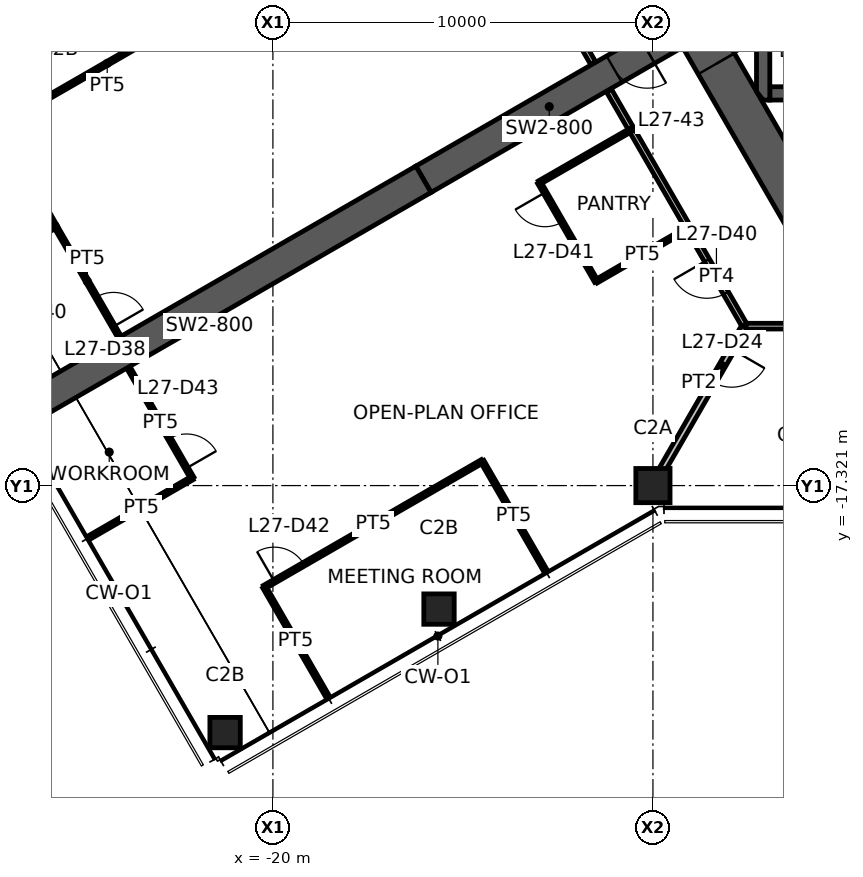
"""IFC4 building model, lengths in metres.
Left out: names, types, materials, properties, quantities, classifications, styles, units other than length and angle.
Written with IfcOpenShell. Run it as: python <this file> out.ifc"""

import sys

from ifc_helpers import new_model, si_unit, direction, frame, frame_2d, origin, origin_2d, place, context, subcontext, project, spatial, polyline, rectangle, hollow_rectangle, outline, extrude, element, fill, save


model = new_model("IFC4")
c1 = context("Model", 3, precision=1e-05, world=origin(), true_north=direction((0.0, 1.0)))
c2 = subcontext(c1, "Body", "Model", "MODEL_VIEW")
j1 = project(units=[si_unit("LENGTHUNIT", "METRE"), si_unit("PLANEANGLEUNIT", "RADIAN")], contexts=[c1])
p1 = place(None, origin())
s1 = spatial("IfcSite", under=j1, at=p1, CompositionType="ELEMENT")
p2 = place(p1, origin())
s2 = spatial("IfcBuilding", under=s1, at=p2, CompositionType="ELEMENT")
p3 = place(p2, frame((0.0, 0.0, 108.0)))
s3 = spatial("IfcBuildingStorey", under=s2, at=p3, CompositionType="ELEMENT", Elevation=108.0)
p4 = place(p3, frame((-10.0, -17.321, 0.0), z_axis=(0.0, 0.0, 1.0), x_axis=(1.0, 0.0, 0.0)))
e1 = element("IfcColumn", 1, at=p4, inside=s3, PredefinedType="COLUMN", context=c2, shape_type="SweptSolid", body=[
    extrude(hollow_rectangle(XDim=0.9, YDim=0.9, WallThickness=0.055, at=origin_2d()), origin(), (0.0, 0.0, 1.0), 3.9),
])
for number, where, z_axis, x_axis in (
    (2, (-15.629, -20.571, 0.0), (0.0, 0.0, 1.0), (1.0, 0.0, 0.0)),
    (3, (-21.258, -23.821, 0.0), (0.0, 0.0, 1.0), (1.0, 0.0, 0.0)),
):
    element("IfcColumn", number, at=place(p3, frame(where, z_axis=z_axis, x_axis=x_axis)), inside=s3, PredefinedType="COLUMN", context=c2, shape_type="SweptSolid", body=[
        extrude(hollow_rectangle(XDim=0.8, YDim=0.8, WallThickness=0.045, at=origin_2d()), origin(), (0.0, 0.0, 1.0), 3.9),
    ])
p5 = place(p3, frame((-11.922, 0.0, 0.0), z_axis=(0.0, 0.0, 1.0), x_axis=(0.500004296715, -0.866022923061, 0.0)))
e4 = element("IfcWall", 4, at=p5, inside=s3, PredefinedType="SHEAR", context=c2, shape_type="SweptSolid", body=[
    extrude(outline(polyline([(-0.318, -0.55), (6.381, -0.55), (7.181, -0.55), (12.24, -0.55), (11.605, 0.55), (7.181, 0.55), (6.381, 0.55), (0.318, 0.55), (-0.318, -0.55)])), origin(), (0.0, 0.0, 1.0), 3.9),
])
p6 = place(p5, frame((6.381, 0.0, 0.0)))
e5 = element("IfcOpeningElement", 5, at=p6, cuts=e4, PredefinedType="OPENING", context=c2, shape_type="SweptSolid", body=[
    extrude(rectangle(XDim=0.8, YDim=2.1, at=frame_2d((0.4, 1.05))), frame((0.0, 0.56, 0.0), z_axis=(0.0, -1.0, 0.0), x_axis=(1.0, 0.0, 0.0)), (0.0, 0.0, 1.0), 1.12),
])
p7 = place(p3, frame((-9.418, -5.438, 0.0), z_axis=(0.0, 0.0, 1.0), x_axis=(-0.866029782078, -0.499992416496, 0.0)))
e6 = element("IfcWall", 6, at=p7, inside=s3, PredefinedType="SHEAR", context=c2, shape_type="SweptSolid", body=[
    extrude(rectangle(XDim=7.646, YDim=0.8, at=frame_2d((3.823, 0.0))), origin(), (0.0, 0.0, 1.0), 3.9),
])
p8 = place(p7, frame((0.85, 0.0, 0.0)))
e7 = element("IfcOpeningElement", 7, at=p8, cuts=e6, PredefinedType="OPENING", context=c2, shape_type="SweptSolid", body=[
    extrude(rectangle(XDim=1.0, YDim=2.1, at=frame_2d((0.5, 1.05))), frame((0.0, 0.41, 0.0), z_axis=(0.0, -1.0, 0.0), x_axis=(1.0, 0.0, 0.0)), (0.0, 0.0, 1.0), 0.82),
])
p9 = place(p3, frame((-16.039, -9.26, 0.0), z_axis=(0.0, 0.0, 1.0), x_axis=(-0.866024837091, -0.50000098154, 0.0)))
e8 = element("IfcWall", 8, at=p9, inside=s3, PredefinedType="SHEAR", context=c2, shape_type="SweptSolid", body=[
    extrude(rectangle(XDim=13.0, YDim=0.8, at=frame_2d((6.5, 0.0))), origin(), (0.0, 0.0, 1.0), 3.9),
])
p10 = place(p3, frame((-6.925, -7.0, 0.0), z_axis=(0.0, 0.0, 1.0), x_axis=(1.0, 0.0, 0.0)))
e9 = element("IfcWall", 9, at=p10, inside=s3, PredefinedType="SHEAR", context=c2, shape_type="SweptSolid", body=[
    extrude(rectangle(XDim=2.25, YDim=0.35, at=frame_2d((1.125, 0.0))), origin(), (0.0, 0.0, 1.0), 3.9),
])
p11 = place(p3, frame((-7.1, -3.775, 0.0), z_axis=(0.0, 0.0, 1.0), x_axis=(0.0, -1.0, 0.0)))
e10 = element("IfcWall", 10, at=p11, inside=s3, PredefinedType="SHEAR", context=c2, shape_type="SweptSolid", body=[
    extrude(outline(polyline([(0.0, -0.175), (3.175, -0.175), (3.4, 0.0), (3.4, 0.175), (0.0, 0.175), (0.0, -0.175)])), origin(), (0.0, 0.0, 1.0), 3.9),
])
p12 = place(p3, frame((-7.578, -13.125, 0.0), z_axis=(0.0, 0.0, 1.0), x_axis=(-0.500008905493, -0.866020262135, 0.0)))
e11 = element("IfcWall", 11, at=p12, inside=s3, PredefinedType="PARTITIONING", context=c2, shape_type="SweptSolid", body=[
    extrude(rectangle(XDim=4.845, YDim=0.175, at=frame_2d((2.422, 0.0))), origin(), (0.0, 0.0, 1.0), 3.05),
])
p13 = place(p12, frame((0.7, 0.0, 0.0)))
e12 = element("IfcOpeningElement", 12, at=p13, cuts=e11, PredefinedType="OPENING", context=c2, shape_type="SweptSolid", body=[
    extrude(rectangle(XDim=1.0, YDim=2.1, at=frame_2d((0.5, 1.05))), frame((0.0, 0.098, 0.0), z_axis=(0.0, -1.0, 0.0), x_axis=(1.0, 0.0, 0.0)), (0.0, 0.0, 1.0), 0.195),
])
p14 = place(p3, frame((-11.577, -6.199, 0.0), z_axis=(0.0, 0.0, 1.0), x_axis=(-0.500001961223, 0.866024271469, 0.0)))
e13 = element("IfcWall", 13, at=p14, inside=s3, PredefinedType="PARTITIONING", context=c2, shape_type="SweptSolid", body=[
    extrude(rectangle(XDim=7.158, YDim=0.15, at=frame_2d((3.579, 0.0))), origin(), (0.0, 0.0, 1.0), 2.95),
])
p15 = place(p3, frame((-21.492, -4.557, 0.0), z_axis=(0.0, 0.0, 1.0), x_axis=(-0.866343956507, -0.499447844147, 0.0)))
e14 = element("IfcWall", 14, at=p15, inside=s3, PredefinedType="PARTITIONING", context=c2, shape_type="SweptSolid", body=[
    extrude(rectangle(XDim=6.62, YDim=0.1, at=frame_2d((3.31, 0.0))), origin(), (0.0, 0.0, 1.0), 2.95),
])
p16 = place(p15, frame((0.3, 0.0, 0.0)))
e15 = element("IfcOpeningElement", 15, at=p16, cuts=e14, PredefinedType="OPENING", context=c2, shape_type="SweptSolid", body=[
    extrude(rectangle(XDim=0.9, YDim=2.1, at=frame_2d((0.45, 1.05))), frame((0.0, 0.06, 0.0), z_axis=(0.0, -1.0, 0.0), x_axis=(1.0, 0.0, 0.0)), (0.0, 0.0, 1.0), 0.12),
])
p17 = place(p3, frame((-25.719, -10.493, 0.0), z_axis=(0.0, 0.0, 1.0), x_axis=(-0.865269267775, -0.501307384988, 0.0)))
e16 = element("IfcWall", 16, at=p17, inside=s3, PredefinedType="PARTITIONING", context=c2, shape_type="SweptSolid", body=[
    extrude(rectangle(XDim=3.301, YDim=0.1, at=frame_2d((1.65, 0.0))), origin(), (0.0, 0.0, 1.0), 2.95),
])
p18 = place(p3, frame((-27.227, -7.863, 0.0), z_axis=(0.0, 0.0, 1.0), x_axis=(0.495913871635, -0.868371712989, 0.0)))
e17 = element("IfcWall", 17, at=p18, inside=s3, PredefinedType="PARTITIONING", context=c2, shape_type="SweptSolid", body=[
    extrude(rectangle(XDim=3.038, YDim=0.1, at=frame_2d((1.519, 0.0))), origin(), (0.0, 0.0, 1.0), 2.95),
])
p19 = place(p18, frame((0.3, 0.0, 0.0)))
e18 = element("IfcOpeningElement", 18, at=p19, cuts=e17, PredefinedType="OPENING", context=c2, shape_type="SweptSolid", body=[
    extrude(rectangle(XDim=0.9, YDim=2.1, at=frame_2d((0.45, 1.05))), frame((0.0, 0.06, 0.0), z_axis=(0.0, -1.0, 0.0), x_axis=(1.0, 0.0, 0.0)), (0.0, 0.0, 1.0), 0.12),
])
p20 = place(p3, frame((-25.72, -10.5, 0.0), z_axis=(0.0, 0.0, 1.0), x_axis=(0.501088030279, -0.865396317251, 0.0)))
e19 = element("IfcWall", 19, at=p20, inside=s3, PredefinedType="PARTITIONING", context=c2, shape_type="SweptSolid", body=[
    extrude(rectangle(XDim=3.347, YDim=0.1, at=frame_2d((1.673, 0.0))), origin(), (0.0, 0.0, 1.0), 2.95),
])
p21 = place(p20, frame((2.147, 0.0, 0.0)))
e20 = element("IfcOpeningElement", 20, at=p21, cuts=e19, PredefinedType="OPENING", context=c2, shape_type="SweptSolid", body=[
    extrude(rectangle(XDim=0.9, YDim=2.1, at=frame_2d((0.45, 1.05))), frame((0.0, 0.06, 0.0), z_axis=(0.0, -1.0, 0.0), x_axis=(1.0, 0.0, 0.0)), (0.0, 0.0, 1.0), 0.12),
])
p22 = place(p3, frame((-9.064, -10.551, 0.0), z_axis=(0.0, 0.0, 1.0), x_axis=(-0.499977562641, 0.866038357612, 0.0)))
e21 = element("IfcWall", 21, at=p22, inside=s3, PredefinedType="PARTITIONING", context=c2, shape_type="SweptSolid", body=[
    extrude(rectangle(XDim=3.01, YDim=0.15, at=frame_2d((1.505, 0.0))), origin(), (0.0, 0.0, 1.0), 2.95),
])
p23 = place(p3, frame((-10.564, -7.952, 0.0), z_axis=(0.0, 0.0, 1.0), x_axis=(-0.500085263423, 0.865976171327, 0.0)))
e22 = element("IfcWall", 22, at=p23, inside=s3, PredefinedType="PARTITIONING", context=c2, shape_type="SweptSolid", body=[
    extrude(rectangle(XDim=1.184, YDim=0.15, at=frame_2d((0.592, 0.0))), origin(), (0.0, 0.0, 1.0), 2.95),
])
p24 = place(p3, frame((-7.589, -13.105, 0.0), z_axis=(0.0, 0.0, 1.0), x_axis=(-0.499972416139, 0.866041328748, 0.0)))
e23 = element("IfcWall", 23, at=p24, inside=s3, PredefinedType="PARTITIONING", context=c2, shape_type="SweptSolid", body=[
    extrude(rectangle(XDim=2.959, YDim=0.15, at=frame_2d((1.479, 0.0))), origin(), (0.0, 0.0, 1.0), 2.95),
])
p25 = place(p24, frame((0.979, 0.0, 0.0)))
e24 = element("IfcOpeningElement", 24, at=p25, cuts=e23, PredefinedType="OPENING", context=c2, shape_type="SweptSolid", body=[
    extrude(rectangle(XDim=1.0, YDim=2.1, at=frame_2d((0.5, 1.05))), frame((0.0, 0.085, 0.0), z_axis=(0.0, -1.0, 0.0), x_axis=(1.0, 0.0, 0.0)), (0.0, 0.0, 1.0), 0.17),
])
p26 = place(p3, frame((-12.991, -9.348, 0.0), z_axis=(0.0, 0.0, 1.0), x_axis=(0.866817750494, 0.498625097071, 0.0)))
e25 = element("IfcWall", 25, at=p26, inside=s3, PredefinedType="PARTITIONING", context=c2, shape_type="SweptSolid", body=[
    extrude(rectangle(XDim=2.8, YDim=0.1, at=frame_2d((1.4, 0.0))), origin(), (0.0, 0.0, 1.0), 2.95),
])
p27 = place(p3, frame((-11.491, -11.946, 0.0), z_axis=(0.0, 0.0, 1.0), x_axis=(-0.499990139034, 0.866031096941, 0.0)))
e26 = element("IfcWall", 26, at=p27, inside=s3, PredefinedType="PARTITIONING", context=c2, shape_type="SweptSolid", body=[
    extrude(rectangle(XDim=3.0, YDim=0.1, at=frame_2d((1.5, 0.0))), origin(), (0.0, 0.0, 1.0), 2.95),
])
p28 = place(p27, frame((1.8, 0.0, 0.0)))
e27 = element("IfcOpeningElement", 27, at=p28, cuts=e26, PredefinedType="OPENING", context=c2, shape_type="SweptSolid", body=[
    extrude(rectangle(XDim=0.9, YDim=2.1, at=frame_2d((0.45, 1.05))), frame((0.0, 0.06, 0.0), z_axis=(0.0, -1.0, 0.0), x_axis=(1.0, 0.0, 0.0)), (0.0, 0.0, 1.0), 0.12),
])
p29 = place(p3, frame((-9.069, -10.542, 0.0), z_axis=(0.0, 0.0, 1.0), x_axis=(-0.865195372903, -0.501434907746, 0.0)))
e28 = element("IfcWall", 28, at=p29, inside=s3, PredefinedType="PARTITIONING", context=c2, shape_type="SweptSolid", body=[
    extrude(rectangle(XDim=2.8, YDim=0.1, at=frame_2d((1.4, 0.0))), origin(), (0.0, 0.0, 1.0), 2.95),
])
p30 = place(p3, frame((-20.225, -19.991, 0.0), z_axis=(0.0, 0.0, 1.0), x_axis=(0.866030817826, 0.499990622488, 0.0)))
e29 = element("IfcWall", 29, at=p30, inside=s3, PredefinedType="PARTITIONING", context=c2, shape_type="SweptSolid", body=[
    extrude(rectangle(XDim=6.62, YDim=0.1, at=frame_2d((3.31, 0.0))), origin(), (0.0, 0.0, 1.0), 2.95),
])
p31 = place(p30, frame((0.3, 0.0, 0.0)))
e30 = element("IfcOpeningElement", 30, at=p31, cuts=e29, PredefinedType="OPENING", context=c2, shape_type="SweptSolid", body=[
    extrude(rectangle(XDim=0.9, YDim=2.1, at=frame_2d((0.45, 1.05))), frame((0.0, 0.06, 0.0), z_axis=(0.0, -1.0, 0.0), x_axis=(1.0, 0.0, 0.0)), (0.0, 0.0, 1.0), 0.12),
])
p32 = place(p3, frame((-18.585, -22.831, 0.0), z_axis=(0.0, 0.0, 1.0), x_axis=(-0.50002956483, 0.866008333849, 0.0)))
e31 = element("IfcWall", 31, at=p32, inside=s3, PredefinedType="PARTITIONING", context=c2, shape_type="SweptSolid", body=[
    extrude(rectangle(XDim=3.28, YDim=0.1, at=frame_2d((1.64, 0.0))), origin(), (0.0, 0.0, 1.0), 2.95),
])
p33 = place(p3, frame((-14.492, -16.681, 0.0), z_axis=(0.0, 0.0, 1.0), x_axis=(0.499974350878, -0.866040211805, 0.0)))
e32 = element("IfcWall", 32, at=p33, inside=s3, PredefinedType="PARTITIONING", context=c2, shape_type="SweptSolid", body=[
    extrude(rectangle(XDim=3.3, YDim=0.1, at=frame_2d((1.65, 0.0))), origin(), (0.0, 0.0, 1.0), 2.95),
])
p34 = place(p3, frame((-23.797, -14.224, 0.0), z_axis=(0.0, 0.0, 1.0), x_axis=(0.500015043844, -0.866016718043, 0.0)))
e33 = element("IfcWall", 33, at=p34, inside=s3, PredefinedType="PARTITIONING", context=c2, shape_type="SweptSolid", body=[
    extrude(rectangle(XDim=3.347, YDim=0.1, at=frame_2d((1.673, 0.0))), origin(), (0.0, 0.0, 1.0), 2.95),
])
p35 = place(p34, frame((2.147, 0.0, 0.0)))
e34 = element("IfcOpeningElement", 34, at=p35, cuts=e33, PredefinedType="OPENING", context=c2, shape_type="SweptSolid", body=[
    extrude(rectangle(XDim=0.9, YDim=2.1, at=frame_2d((0.45, 1.05))), frame((0.0, 0.06, 0.0), z_axis=(0.0, -1.0, 0.0), x_axis=(1.0, 0.0, 0.0)), (0.0, 0.0, 1.0), 0.12),
])
p36 = place(p3, frame((-22.123, -17.122, 0.0), z_axis=(0.0, 0.0, 1.0), x_axis=(-0.86602952684, -0.49999285859, 0.0)))
e35 = element("IfcWall", 35, at=p36, inside=s3, PredefinedType="PARTITIONING", context=c2, shape_type="SweptSolid", body=[
    extrude(rectangle(XDim=3.1, YDim=0.1, at=frame_2d((1.55, 0.0))), origin(), (0.0, 0.0, 1.0), 2.95),
])
p37 = place(p3, frame((3.251, -13.125, 0.0), z_axis=(0.0, 0.0, 1.0), x_axis=(-1.0, 0.0, 0.0)))
e36 = element("IfcWall", 36, at=p37, inside=s3, PredefinedType="PARTITIONING", context=c2, shape_type="SweptSolid", body=[
    extrude(rectangle(XDim=10.806, YDim=0.15, at=frame_2d((5.403, 0.0))), origin(), (0.0, 0.0, 1.0), 2.95),
])
p38 = place(p37, frame((4.903, 0.0, 0.0)))
e37 = element("IfcOpeningElement", 37, at=p38, cuts=e36, PredefinedType="OPENING", context=c2, shape_type="SweptSolid", body=[
    extrude(rectangle(XDim=1.0, YDim=2.1, at=frame_2d((0.5, 1.05))), frame((0.0, 0.085, 0.0), z_axis=(0.0, -1.0, 0.0), x_axis=(1.0, 0.0, 0.0)), (0.0, 0.0, 1.0), 0.17),
])
p39 = place(p6, origin())
e38 = element("IfcDoor", 38, at=p39, inside=s3, OperationType="SINGLE_SWING_RIGHT", PredefinedType="DOOR", context=c2, shape_type="SweptSolid", body=[
    extrude(rectangle(XDim=0.8, YDim=2.1, at=frame_2d((0.4, 1.05))), frame((0.0, 0.025, 0.0), z_axis=(0.0, -1.0, 0.0), x_axis=(1.0, 0.0, 0.0)), (0.0, 0.0, 1.0), 0.05),
])
fill(e5, e38)
p40 = place(p8, origin())
e39 = element("IfcDoor", 39, at=p40, inside=s3, OperationType="SINGLE_SWING_LEFT", PredefinedType="DOOR", context=c2, shape_type="SweptSolid", body=[
    extrude(rectangle(XDim=1.0, YDim=2.1, at=frame_2d((0.5, 1.05))), frame((0.0, 0.025, 0.0), z_axis=(0.0, -1.0, 0.0), x_axis=(1.0, 0.0, 0.0)), (0.0, 0.0, 1.0), 0.05),
])
fill(e7, e39)
p41 = place(p13, origin())
e40 = element("IfcDoor", 40, at=p41, inside=s3, OperationType="SINGLE_SWING_LEFT", PredefinedType="DOOR", context=c2, shape_type="SweptSolid", body=[
    extrude(rectangle(XDim=1.0, YDim=2.1, at=frame_2d((0.5, 1.05))), frame((0.0, 0.025, 0.0), z_axis=(0.0, -1.0, 0.0), x_axis=(1.0, 0.0, 0.0)), (0.0, 0.0, 1.0), 0.05),
])
fill(e12, e40)
p42 = place(p21, origin())
e41 = element("IfcDoor", 41, at=p42, inside=s3, OperationType="SINGLE_SWING_RIGHT", PredefinedType="DOOR", context=c2, shape_type="SweptSolid", body=[
    extrude(rectangle(XDim=0.9, YDim=2.1, at=frame_2d((0.45, 1.05))), frame((0.0, 0.025, 0.0), z_axis=(0.0, -1.0, 0.0), x_axis=(1.0, 0.0, 0.0)), (0.0, 0.0, 1.0), 0.05),
])
fill(e20, e41)
p43 = place(p25, origin())
e42 = element("IfcDoor", 42, at=p43, inside=s3, OperationType="SINGLE_SWING_RIGHT", PredefinedType="DOOR", context=c2, shape_type="SweptSolid", body=[
    extrude(rectangle(XDim=1.0, YDim=2.1, at=frame_2d((0.5, 1.05))), frame((0.0, 0.025, 0.0), z_axis=(0.0, -1.0, 0.0), x_axis=(1.0, 0.0, 0.0)), (0.0, 0.0, 1.0), 0.05),
])
fill(e24, e42)
p44 = place(p28, origin())
e43 = element("IfcDoor", 43, at=p44, inside=s3, OperationType="SINGLE_SWING_RIGHT", PredefinedType="DOOR", context=c2, shape_type="SweptSolid", body=[
    extrude(rectangle(XDim=0.9, YDim=2.1, at=frame_2d((0.45, 1.05))), frame((0.0, 0.025, 0.0), z_axis=(0.0, -1.0, 0.0), x_axis=(1.0, 0.0, 0.0)), (0.0, 0.0, 1.0), 0.05),
])
fill(e27, e43)
p45 = place(p31, origin())
e44 = element("IfcDoor", 44, at=p45, inside=s3, OperationType="SINGLE_SWING_LEFT", PredefinedType="DOOR", context=c2, shape_type="SweptSolid", body=[
    extrude(rectangle(XDim=0.9, YDim=2.1, at=frame_2d((0.45, 1.05))), frame((0.0, 0.025, 0.0), z_axis=(0.0, -1.0, 0.0), x_axis=(1.0, 0.0, 0.0)), (0.0, 0.0, 1.0), 0.05),
])
fill(e30, e44)
p46 = place(p35, origin())
e45 = element("IfcDoor", 45, at=p46, inside=s3, OperationType="SINGLE_SWING_RIGHT", PredefinedType="DOOR", context=c2, shape_type="SweptSolid", body=[
    extrude(rectangle(XDim=0.9, YDim=2.1, at=frame_2d((0.45, 1.05))), frame((0.0, 0.025, 0.0), z_axis=(0.0, -1.0, 0.0), x_axis=(1.0, 0.0, 0.0)), (0.0, 0.0, 1.0), 0.05),
])
fill(e34, e45)
save(model, sys.argv[1])
